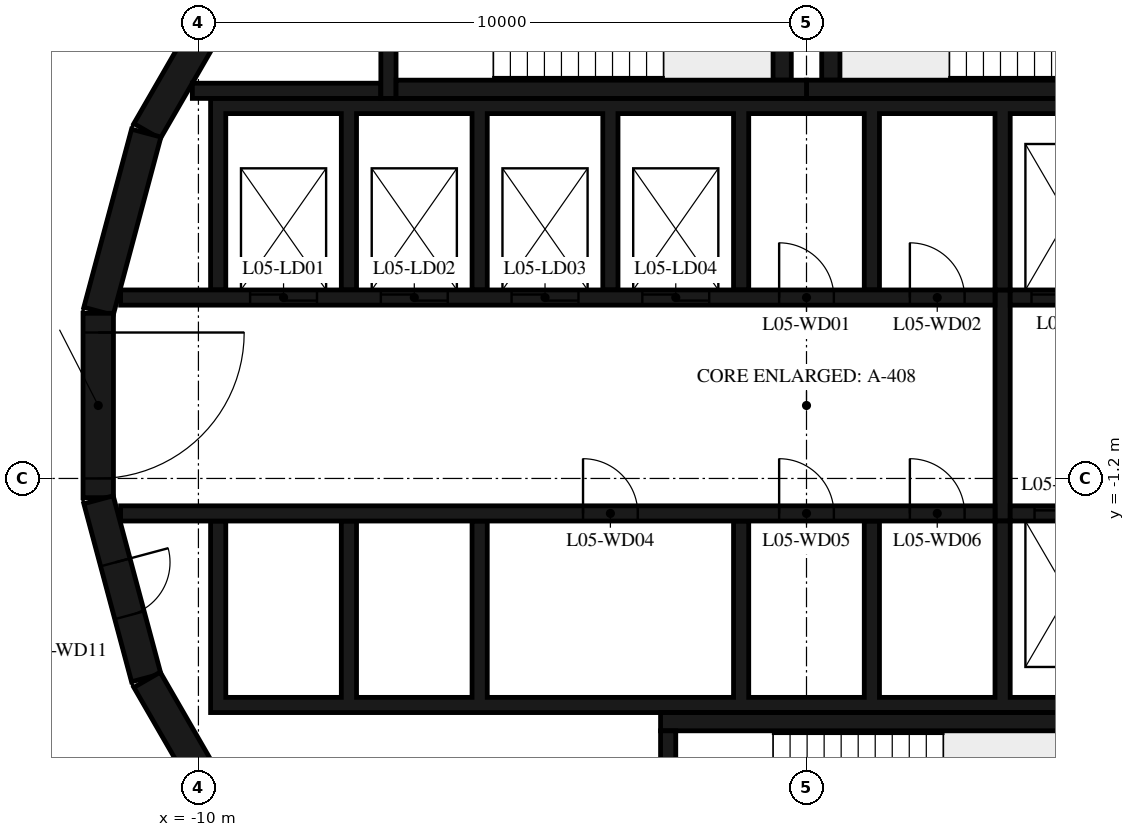
"""IFC4 building model, lengths in metres.
Left out: names, types, materials, properties, quantities, classifications, styles, units other than length and angle.
Written with IfcOpenShell. Run it as: python <this file> out.ifc"""

import sys

from ifc_helpers import new_model, si_unit, direction, frame, frame_2d, origin, place, context, subcontext, project, spatial, polyline, rectangle, outline, extrude, element, fill, save


model = new_model("IFC4")
c1 = context("Model", 3, precision=1e-05, world=origin(), true_north=direction((0.0, 1.0)))
c2 = subcontext(c1, "Body", "Model", "MODEL_VIEW")
j1 = project(units=[si_unit("LENGTHUNIT", "METRE"), si_unit("PLANEANGLEUNIT", "RADIAN")], contexts=[c1])
p1 = place(None, origin())
s1 = spatial("IfcSite", under=j1, at=p1, CompositionType="ELEMENT")
p2 = place(p1, origin())
s2 = spatial("IfcBuilding", under=s1, at=p2, CompositionType="ELEMENT")
p3 = place(p2, frame((0.0, 0.0, 28.2)))
s3 = spatial("IfcBuildingStorey", under=s2, at=p3, CompositionType="ELEMENT", Elevation=28.2)
for number, where, z_axis, x_axis in (
    (1, (-9.329, 7.137, 0.0), (0.0, 0.0, 1.0), (-0.5, -0.866, 0.0)),
    (2, (-10.858, 4.479, 0.0), (0.0, 0.0, 1.0), (-0.259, -0.966, 0.0)),
):
    element("IfcWall", number, at=place(p3, frame(where, z_axis=z_axis, x_axis=x_axis)), inside=s3, PredefinedType="SHEAR", context=c2, shape_type="SweptSolid", body=[
        extrude(rectangle(XDim=3.033, YDim=0.5, at=frame_2d((1.516, 0.0))), origin(), (0.0, 0.0, 1.0), 4.35),
    ])
p4 = place(p3, frame((-11.647, 1.516, 0.0), z_axis=(0.0, 0.0, 1.0), x_axis=(0.0, -1.0, 0.0)))
e3 = element("IfcWall", 3, at=p4, inside=s3, PredefinedType="SHEAR", context=c2, shape_type="SweptSolid", body=[
    extrude(rectangle(XDim=3.033, YDim=0.5, at=frame_2d((1.516, 0.0))), origin(), (0.0, 0.0, 1.0), 4.35),
])
p5 = place(p4, frame((0.316, 0.0, 0.0)))
e4 = element("IfcOpeningElement", 4, at=p5, cuts=e3, PredefinedType="OPENING", context=c2, shape_type="SweptSolid", body=[
    extrude(rectangle(XDim=2.4, YDim=2.1, at=frame_2d((1.2, 1.05))), frame((0.0, 0.26, 0.0), z_axis=(0.0, -1.0, 0.0), x_axis=(1.0, 0.0, 0.0)), (0.0, 0.0, 1.0), 0.52),
])
p6 = place(p3, frame((-11.643, -1.55, 0.0), z_axis=(0.0, 0.0, 1.0), x_axis=(0.258734743916, -0.965948410781, 0.0)))
e5 = element("IfcWall", 5, at=p6, inside=s3, PredefinedType="SHEAR", context=c2, shape_type="SweptSolid", body=[
    extrude(rectangle(XDim=3.033, YDim=0.5, at=frame_2d((1.516, 0.0))), origin(), (0.0, 0.0, 1.0), 4.35),
])
p7 = place(p6, frame((1.066, 0.0, 0.0)))
e6 = element("IfcOpeningElement", 6, at=p7, cuts=e5, PredefinedType="OPENING", context=c2, shape_type="SweptSolid", body=[
    extrude(rectangle(XDim=0.9, YDim=2.1, at=frame_2d((0.45, 1.05))), frame((0.0, 0.26, 0.0), z_axis=(0.0, -1.0, 0.0), x_axis=(1.0, 0.0, 0.0)), (0.0, 0.0, 1.0), 0.52),
])
p8 = place(p3, frame((-10.845, -4.51, 0.0), z_axis=(0.0, 0.0, 1.0), x_axis=(0.500087131594, -0.865975092491, 0.0)))
e7 = element("IfcWall", 7, at=p8, inside=s3, PredefinedType="SHEAR", context=c2, shape_type="SweptSolid", body=[
    extrude(rectangle(XDim=3.033, YDim=0.5, at=frame_2d((1.516, 0.0))), origin(), (0.0, 0.0, 1.0), 4.35),
])
p9 = place(p3, frame((0.0, 5.2, 0.0), z_axis=(0.0, 0.0, 1.0), x_axis=(1.0, 0.0, 0.0)))
e8 = element("IfcWall", 8, at=p9, inside=s3, PredefinedType="SHEAR", context=c2, shape_type="SweptSolid", body=[
    extrude(rectangle(XDim=6.75, YDim=0.3, at=frame_2d((3.375, 0.0))), origin(), (0.0, 0.0, 1.0), 4.35),
])
p10 = place(p3, frame((0.4, 5.35, 0.0), z_axis=(0.0, 0.0, 1.0), x_axis=(0.0, 1.0, 0.0)))
e9 = element("IfcWall", 9, at=p10, inside=s3, PredefinedType="SHEAR", context=c2, shape_type="SweptSolid", body=[
    extrude(rectangle(XDim=3.32, YDim=0.3, at=frame_2d((1.66, 0.0))), origin(), (0.0, 0.0, 1.0), 4.35),
])
p11 = place(p3, frame((-6.75, 5.2, 0.0), z_axis=(0.0, 0.0, 1.0), x_axis=(1.0, 0.0, 0.0)))
e10 = element("IfcWall", 10, at=p11, inside=s3, PredefinedType="SHEAR", context=c2, shape_type="SweptSolid", body=[
    extrude(rectangle(XDim=6.75, YDim=0.3, at=frame_2d((3.375, 0.0))), origin(), (0.0, 0.0, 1.0), 4.35),
])
p12 = place(p3, frame((-0.4, 5.35, 0.0), z_axis=(0.0, 0.0, 1.0), x_axis=(0.0, 1.0, 0.0)))
e11 = element("IfcWall", 11, at=p12, inside=s3, PredefinedType="SHEAR", context=c2, shape_type="SweptSolid", body=[
    extrude(rectangle(XDim=3.32, YDim=0.3, at=frame_2d((1.66, 0.0))), origin(), (0.0, 0.0, 1.0), 4.35),
])
p13 = place(p3, frame((-6.875, 8.97, 0.0), z_axis=(0.0, 0.0, 1.0), x_axis=(0.0, -1.0, 0.0)))
e12 = element("IfcWall", 12, at=p13, inside=s3, PredefinedType="SHEAR", context=c2, shape_type="SweptSolid", body=[
    extrude(rectangle(XDim=3.92, YDim=0.25, at=frame_2d((1.96, 0.0))), origin(), (0.0, 0.0, 1.0), 4.35),
])
p14 = place(p13, frame((1.61, 0.0, 0.0)))
e13 = element("IfcOpeningElement", 13, at=p14, cuts=e12, PredefinedType="OPENING", context=c2, shape_type="SweptSolid", body=[
    extrude(rectangle(XDim=1.2, YDim=2.1, at=frame_2d((0.6, 1.05))), frame((0.0, 0.135, 0.0), z_axis=(0.0, -1.0, 0.0), x_axis=(1.0, 0.0, 0.0)), (0.0, 0.0, 1.0), 0.27),
])
p15 = place(p3, frame((-7.0, 5.175, 0.0), z_axis=(0.0, 0.0, 1.0), x_axis=(-1.0, 0.0, 0.0)))
e14 = element("IfcWall", 14, at=p15, inside=s3, PredefinedType="SHEAR", context=c2, shape_type="SweptSolid", body=[
    extrude(rectangle(XDim=3.1, YDim=0.25, at=frame_2d((1.55, 0.0))), origin(), (0.0, 0.0, 1.0), 4.35),
])
p16 = place(p3, frame((-2.275, -8.67, 0.0), z_axis=(0.0, 0.0, 1.0), x_axis=(0.0, 1.0, 0.0)))
e15 = element("IfcWall", 15, at=p16, inside=s3, PredefinedType="SHEAR", context=c2, shape_type="SweptSolid", body=[
    extrude(rectangle(XDim=3.32, YDim=0.25, at=frame_2d((1.66, 0.0))), origin(), (0.0, 0.0, 1.0), 4.35),
])
p17 = place(p3, frame((-2.4, -5.2, 0.0), z_axis=(0.0, 0.0, 1.0), x_axis=(1.0, 0.0, 0.0)))
e16 = element("IfcWall", 16, at=p17, inside=s3, PredefinedType="SHEAR", context=c2, shape_type="SweptSolid", body=[
    extrude(rectangle(XDim=7.05, YDim=0.3, at=frame_2d((3.525, 0.0))), origin(), (0.0, 0.0, 1.0), 4.35),
])
p18 = place(p3, origin())
e17 = element("IfcWall", 17, at=p18, inside=s3, PredefinedType="SHEAR", context=c2, shape_type="SweptSolid", body=[
    extrude(outline(polyline([(-9.55, 4.8), (-7.65, 4.8), (-7.65, 1.9), (-7.4, 1.9), (-7.4, 4.8), (-5.5, 4.8), (-5.5, 1.9), (-5.25, 1.9), (-5.25, 4.8), (-3.35, 4.8), (-3.35, 1.9), (-3.1, 1.9), (-3.1, 4.8), (-1.2, 4.8), (-1.2, 1.9), (-0.95, 1.9), (-0.95, 4.8), (0.95, 4.8), (0.95, 1.9), (1.2, 1.9), (1.2, 4.8), (3.1, 4.8), (3.1, 1.9), (3.35, 1.9), (3.35, 4.8), (5.25, 4.8), (5.25, 1.9), (5.5, 1.9), (5.5, 4.8), (7.4, 4.8), (7.4, 1.9), (7.65, 1.9), (7.65, 4.8), (9.55, 4.8), (9.55, 1.9), (9.8, 1.9), (9.8, 4.8), (9.8, 5.05), (-9.8, 5.05), (-9.8, 4.8), (-9.8, 1.9), (-9.55, 1.9), (-9.55, 4.8)])), origin(), (0.0, 0.0, 1.0), 4.35),
])
p19 = place(p3, origin())
e18 = element("IfcWall", 18, at=p19, inside=s3, PredefinedType="SHEAR", context=c2, shape_type="SweptSolid", body=[
    extrude(outline(polyline([(9.8, -5.05), (9.8, -4.8), (9.8, -1.9), (9.55, -1.9), (9.55, -4.8), (7.65, -4.8), (7.65, -1.9), (7.4, -1.9), (7.4, -4.8), (5.5, -4.8), (5.5, -1.9), (5.25, -1.9), (5.25, -4.8), (3.35, -4.8), (3.35, -1.9), (3.1, -1.9), (3.1, -4.8), (1.2, -4.8), (1.2, -1.9), (0.95, -1.9), (0.95, -4.8), (-0.95, -4.8), (-0.95, -1.9), (-1.2, -1.9), (-1.2, -4.8), (-5.25, -4.8), (-5.25, -1.9), (-5.5, -1.9), (-5.5, -4.8), (-7.4, -4.8), (-7.4, -1.9), (-7.65, -1.9), (-7.65, -4.8), (-9.55, -4.8), (-9.55, -1.9), (-9.8, -1.9), (-9.8, -4.8), (-9.8, -5.05), (9.8, -5.05)])), origin(), (0.0, 0.0, 1.0), 4.35),
])
p20 = place(p3, frame((-11.28, 1.775, 0.0), z_axis=(0.0, 0.0, 1.0), x_axis=(1.0, 0.0, 0.0)))
e19 = element("IfcWall", 19, at=p20, inside=s3, PredefinedType="SHEAR", context=c2, shape_type="SweptSolid", body=[
    extrude(rectangle(XDim=14.38, YDim=0.25, at=frame_2d((7.19, 0.0))), origin(), (0.0, 0.0, 1.0), 4.35),
])
p21 = place(p20, frame((2.13, 0.0, 0.0)))
e20 = element("IfcOpeningElement", 20, at=p21, cuts=e19, PredefinedType="OPENING", context=c2, shape_type="SweptSolid", body=[
    extrude(rectangle(XDim=1.1, YDim=2.1, at=frame_2d((0.55, 1.05))), frame((0.0, 0.135, 0.0), z_axis=(0.0, -1.0, 0.0), x_axis=(1.0, 0.0, 0.0)), (0.0, 0.0, 1.0), 0.27),
])
p22 = place(p20, frame((4.28, 0.0, 0.0)))
e21 = element("IfcOpeningElement", 21, at=p22, cuts=e19, PredefinedType="OPENING", context=c2, shape_type="SweptSolid", body=[
    extrude(rectangle(XDim=1.1, YDim=2.1, at=frame_2d((0.55, 1.05))), frame((0.0, 0.135, 0.0), z_axis=(0.0, -1.0, 0.0), x_axis=(1.0, 0.0, 0.0)), (0.0, 0.0, 1.0), 0.27),
])
p23 = place(p20, frame((6.43, 0.0, 0.0)))
e22 = element("IfcOpeningElement", 22, at=p23, cuts=e19, PredefinedType="OPENING", context=c2, shape_type="SweptSolid", body=[
    extrude(rectangle(XDim=1.1, YDim=2.1, at=frame_2d((0.55, 1.05))), frame((0.0, 0.135, 0.0), z_axis=(0.0, -1.0, 0.0), x_axis=(1.0, 0.0, 0.0)), (0.0, 0.0, 1.0), 0.27),
])
p24 = place(p20, frame((8.58, 0.0, 0.0)))
e23 = element("IfcOpeningElement", 23, at=p24, cuts=e19, PredefinedType="OPENING", context=c2, shape_type="SweptSolid", body=[
    extrude(rectangle(XDim=1.1, YDim=2.1, at=frame_2d((0.55, 1.05))), frame((0.0, 0.135, 0.0), z_axis=(0.0, -1.0, 0.0), x_axis=(1.0, 0.0, 0.0)), (0.0, 0.0, 1.0), 0.27),
])
p25 = place(p20, frame((10.83, 0.0, 0.0)))
e24 = element("IfcOpeningElement", 24, at=p25, cuts=e19, PredefinedType="OPENING", context=c2, shape_type="SweptSolid", body=[
    extrude(rectangle(XDim=0.9, YDim=2.1, at=frame_2d((0.45, 1.05))), frame((0.0, 0.135, 0.0), z_axis=(0.0, -1.0, 0.0), x_axis=(1.0, 0.0, 0.0)), (0.0, 0.0, 1.0), 0.27),
])
p26 = place(p20, frame((12.98, 0.0, 0.0)))
e25 = element("IfcOpeningElement", 25, at=p26, cuts=e19, PredefinedType="OPENING", context=c2, shape_type="SweptSolid", body=[
    extrude(rectangle(XDim=0.9, YDim=2.1, at=frame_2d((0.45, 1.05))), frame((0.0, 0.135, 0.0), z_axis=(0.0, -1.0, 0.0), x_axis=(1.0, 0.0, 0.0)), (0.0, 0.0, 1.0), 0.27),
])
p27 = place(p3, frame((3.35, 1.775, 0.0), z_axis=(0.0, 0.0, 1.0), x_axis=(1.0, 0.0, 0.0)))
e26 = element("IfcWall", 26, at=p27, inside=s3, PredefinedType="SHEAR", context=c2, shape_type="SweptSolid", body=[
    extrude(rectangle(XDim=7.93, YDim=0.25, at=frame_2d((3.965, 0.0))), origin(), (0.0, 0.0, 1.0), 4.35),
])
p28 = place(p27, frame((0.35, 0.0, 0.0)))
e27 = element("IfcOpeningElement", 27, at=p28, cuts=e26, PredefinedType="OPENING", context=c2, shape_type="SweptSolid", body=[
    extrude(rectangle(XDim=1.2, YDim=2.4, at=frame_2d((0.6, 1.2))), frame((0.0, 0.135, 0.0), z_axis=(0.0, -1.0, 0.0), x_axis=(1.0, 0.0, 0.0)), (0.0, 0.0, 1.0), 0.27),
])
p29 = place(p27, frame((2.5, 0.0, 0.0)))
e28 = element("IfcOpeningElement", 28, at=p29, cuts=e26, PredefinedType="OPENING", context=c2, shape_type="SweptSolid", body=[
    extrude(rectangle(XDim=1.2, YDim=2.4, at=frame_2d((0.6, 1.2))), frame((0.0, 0.135, 0.0), z_axis=(0.0, -1.0, 0.0), x_axis=(1.0, 0.0, 0.0)), (0.0, 0.0, 1.0), 0.27),
])
p30 = place(p27, frame((4.8, 0.0, 0.0)))
e29 = element("IfcOpeningElement", 29, at=p30, cuts=e26, PredefinedType="OPENING", context=c2, shape_type="SweptSolid", body=[
    extrude(rectangle(XDim=0.9, YDim=2.1, at=frame_2d((0.45, 1.05))), frame((0.0, 0.135, 0.0), z_axis=(0.0, -1.0, 0.0), x_axis=(1.0, 0.0, 0.0)), (0.0, 0.0, 1.0), 0.27),
])
p31 = place(p3, frame((-11.28, -1.775, 0.0), z_axis=(0.0, 0.0, 1.0), x_axis=(1.0, 0.0, 0.0)))
e30 = element("IfcWall", 30, at=p31, inside=s3, PredefinedType="SHEAR", context=c2, shape_type="SweptSolid", body=[
    extrude(rectangle(XDim=14.38, YDim=0.25, at=frame_2d((7.19, 0.0))), origin(), (0.0, 0.0, 1.0), 4.35),
])
p32 = place(p31, frame((7.605, 0.0, 0.0)))
e31 = element("IfcOpeningElement", 31, at=p32, cuts=e30, PredefinedType="OPENING", context=c2, shape_type="SweptSolid", body=[
    extrude(rectangle(XDim=0.9, YDim=2.1, at=frame_2d((0.45, 1.05))), frame((0.0, 0.135, 0.0), z_axis=(0.0, -1.0, 0.0), x_axis=(1.0, 0.0, 0.0)), (0.0, 0.0, 1.0), 0.27),
])
p33 = place(p31, frame((10.83, 0.0, 0.0)))
e32 = element("IfcOpeningElement", 32, at=p33, cuts=e30, PredefinedType="OPENING", context=c2, shape_type="SweptSolid", body=[
    extrude(rectangle(XDim=0.9, YDim=2.1, at=frame_2d((0.45, 1.05))), frame((0.0, 0.135, 0.0), z_axis=(0.0, -1.0, 0.0), x_axis=(1.0, 0.0, 0.0)), (0.0, 0.0, 1.0), 0.27),
])
p34 = place(p31, frame((12.98, 0.0, 0.0)))
e33 = element("IfcOpeningElement", 33, at=p34, cuts=e30, PredefinedType="OPENING", context=c2, shape_type="SweptSolid", body=[
    extrude(rectangle(XDim=0.9, YDim=2.1, at=frame_2d((0.45, 1.05))), frame((0.0, 0.135, 0.0), z_axis=(0.0, -1.0, 0.0), x_axis=(1.0, 0.0, 0.0)), (0.0, 0.0, 1.0), 0.27),
])
p35 = place(p3, frame((3.35, -1.775, 0.0), z_axis=(0.0, 0.0, 1.0), x_axis=(1.0, 0.0, 0.0)))
e34 = element("IfcWall", 34, at=p35, inside=s3, PredefinedType="SHEAR", context=c2, shape_type="SweptSolid", body=[
    extrude(rectangle(XDim=7.93, YDim=0.25, at=frame_2d((3.965, 0.0))), origin(), (0.0, 0.0, 1.0), 4.35),
])
p36 = place(p35, frame((0.4, 0.0, 0.0)))
e35 = element("IfcOpeningElement", 35, at=p36, cuts=e34, PredefinedType="OPENING", context=c2, shape_type="SweptSolid", body=[
    extrude(rectangle(XDim=1.1, YDim=2.4, at=frame_2d((0.55, 1.2))), frame((0.0, 0.135, 0.0), z_axis=(0.0, -1.0, 0.0), x_axis=(1.0, 0.0, 0.0)), (0.0, 0.0, 1.0), 0.27),
])
p37 = place(p35, frame((2.55, 0.0, 0.0)))
e36 = element("IfcOpeningElement", 36, at=p37, cuts=e34, PredefinedType="OPENING", context=c2, shape_type="SweptSolid", body=[
    extrude(rectangle(XDim=1.1, YDim=2.4, at=frame_2d((0.55, 1.2))), frame((0.0, 0.135, 0.0), z_axis=(0.0, -1.0, 0.0), x_axis=(1.0, 0.0, 0.0)), (0.0, 0.0, 1.0), 0.27),
])
p38 = place(p35, frame((4.7, 0.0, 0.0)))
e37 = element("IfcOpeningElement", 37, at=p38, cuts=e34, PredefinedType="OPENING", context=c2, shape_type="SweptSolid", body=[
    extrude(rectangle(XDim=1.1, YDim=2.4, at=frame_2d((0.55, 1.2))), frame((0.0, 0.135, 0.0), z_axis=(0.0, -1.0, 0.0), x_axis=(1.0, 0.0, 0.0)), (0.0, 0.0, 1.0), 0.27),
])
p39 = place(p3, frame((3.225, -1.9, 0.0), z_axis=(0.0, 0.0, 1.0), x_axis=(0.0, 1.0, 0.0)))
e38 = element("IfcWall", 38, at=p39, inside=s3, PredefinedType="SHEAR", context=c2, shape_type="SweptSolid", body=[
    extrude(rectangle(XDim=3.8, YDim=0.25, at=frame_2d((1.9, 0.0))), origin(), (0.0, 0.0, 1.0), 4.35),
])
p40 = place(p5, origin())
e39 = element("IfcDoor", 39, at=p40, inside=s3, OperationType="DOUBLE_DOOR_SINGLE_SWING", PredefinedType="DOOR", context=c2, shape_type="SweptSolid", body=[
    extrude(rectangle(XDim=2.4, YDim=2.1, at=frame_2d((1.2, 1.05))), frame((0.0, 0.025, 0.0), z_axis=(0.0, -1.0, 0.0), x_axis=(1.0, 0.0, 0.0)), (0.0, 0.0, 1.0), 0.05),
])
fill(e4, e39)
p41 = place(p21, origin())
e40 = element("IfcDoor", 40, at=p41, inside=s3, OperationType="DOUBLE_DOOR_SLIDING", PredefinedType="DOOR", context=c2, shape_type="SweptSolid", body=[
    extrude(rectangle(XDim=1.1, YDim=2.1, at=frame_2d((0.55, 1.05))), frame((0.0, 0.025, 0.0), z_axis=(0.0, -1.0, 0.0), x_axis=(1.0, 0.0, 0.0)), (0.0, 0.0, 1.0), 0.05),
])
fill(e20, e40)
p42 = place(p22, origin())
e41 = element("IfcDoor", 41, at=p42, inside=s3, OperationType="DOUBLE_DOOR_SLIDING", PredefinedType="DOOR", context=c2, shape_type="SweptSolid", body=[
    extrude(rectangle(XDim=1.1, YDim=2.1, at=frame_2d((0.55, 1.05))), frame((0.0, 0.025, 0.0), z_axis=(0.0, -1.0, 0.0), x_axis=(1.0, 0.0, 0.0)), (0.0, 0.0, 1.0), 0.05),
])
fill(e21, e41)
p43 = place(p23, origin())
e42 = element("IfcDoor", 42, at=p43, inside=s3, OperationType="DOUBLE_DOOR_SLIDING", PredefinedType="DOOR", context=c2, shape_type="SweptSolid", body=[
    extrude(rectangle(XDim=1.1, YDim=2.1, at=frame_2d((0.55, 1.05))), frame((0.0, 0.025, 0.0), z_axis=(0.0, -1.0, 0.0), x_axis=(1.0, 0.0, 0.0)), (0.0, 0.0, 1.0), 0.05),
])
fill(e22, e42)
p44 = place(p24, origin())
e43 = element("IfcDoor", 43, at=p44, inside=s3, OperationType="DOUBLE_DOOR_SLIDING", PredefinedType="DOOR", context=c2, shape_type="SweptSolid", body=[
    extrude(rectangle(XDim=1.1, YDim=2.1, at=frame_2d((0.55, 1.05))), frame((0.0, 0.025, 0.0), z_axis=(0.0, -1.0, 0.0), x_axis=(1.0, 0.0, 0.0)), (0.0, 0.0, 1.0), 0.05),
])
fill(e23, e43)
p45 = place(p28, origin())
e44 = element("IfcDoor", 44, at=p45, inside=s3, OperationType="DOUBLE_DOOR_SLIDING", PredefinedType="DOOR", context=c2, shape_type="SweptSolid", body=[
    extrude(rectangle(XDim=1.2, YDim=2.4, at=frame_2d((0.6, 1.2))), frame((0.0, 0.025, 0.0), z_axis=(0.0, -1.0, 0.0), x_axis=(1.0, 0.0, 0.0)), (0.0, 0.0, 1.0), 0.05),
])
fill(e27, e44)
p46 = place(p36, origin())
e45 = element("IfcDoor", 45, at=p46, inside=s3, OperationType="DOUBLE_DOOR_SLIDING", PredefinedType="DOOR", context=c2, shape_type="SweptSolid", body=[
    extrude(rectangle(XDim=1.1, YDim=2.4, at=frame_2d((0.55, 1.2))), frame((0.0, 0.025, 0.0), z_axis=(0.0, -1.0, 0.0), x_axis=(1.0, 0.0, 0.0)), (0.0, 0.0, 1.0), 0.05),
])
fill(e35, e45)
p47 = place(p25, origin())
e46 = element("IfcDoor", 46, at=p47, inside=s3, OperationType="SINGLE_SWING_RIGHT", PredefinedType="DOOR", context=c2, shape_type="SweptSolid", body=[
    extrude(rectangle(XDim=0.9, YDim=2.1, at=frame_2d((0.45, 1.05))), frame((0.0, 0.025, 0.0), z_axis=(0.0, -1.0, 0.0), x_axis=(1.0, 0.0, 0.0)), (0.0, 0.0, 1.0), 0.05),
])
fill(e24, e46)
p48 = place(p26, origin())
e47 = element("IfcDoor", 47, at=p48, inside=s3, OperationType="SINGLE_SWING_LEFT", PredefinedType="DOOR", context=c2, shape_type="SweptSolid", body=[
    extrude(rectangle(XDim=0.9, YDim=2.1, at=frame_2d((0.45, 1.05))), frame((0.0, 0.025, 0.0), z_axis=(0.0, -1.0, 0.0), x_axis=(1.0, 0.0, 0.0)), (0.0, 0.0, 1.0), 0.05),
])
fill(e25, e47)
p49 = place(p32, origin())
e48 = element("IfcDoor", 48, at=p49, inside=s3, OperationType="SINGLE_SWING_LEFT", PredefinedType="DOOR", context=c2, shape_type="SweptSolid", body=[
    extrude(rectangle(XDim=0.9, YDim=2.1, at=frame_2d((0.45, 1.05))), frame((0.0, 0.025, 0.0), z_axis=(0.0, -1.0, 0.0), x_axis=(1.0, 0.0, 0.0)), (0.0, 0.0, 1.0), 0.05),
])
fill(e31, e48)
p50 = place(p33, origin())
e49 = element("IfcDoor", 49, at=p50, inside=s3, OperationType="SINGLE_SWING_RIGHT", PredefinedType="DOOR", context=c2, shape_type="SweptSolid", body=[
    extrude(rectangle(XDim=0.9, YDim=2.1, at=frame_2d((0.45, 1.05))), frame((0.0, 0.025, 0.0), z_axis=(0.0, -1.0, 0.0), x_axis=(1.0, 0.0, 0.0)), (0.0, 0.0, 1.0), 0.05),
])
fill(e32, e49)
p51 = place(p34, origin())
e50 = element("IfcDoor", 50, at=p51, inside=s3, OperationType="SINGLE_SWING_LEFT", PredefinedType="DOOR", context=c2, shape_type="SweptSolid", body=[
    extrude(rectangle(XDim=0.9, YDim=2.1, at=frame_2d((0.45, 1.05))), frame((0.0, 0.025, 0.0), z_axis=(0.0, -1.0, 0.0), x_axis=(1.0, 0.0, 0.0)), (0.0, 0.0, 1.0), 0.05),
])
fill(e33, e50)
p52 = place(p7, origin())
e51 = element("IfcDoor", 51, at=p52, inside=s3, OperationType="SINGLE_SWING_RIGHT", PredefinedType="DOOR", context=c2, shape_type="SweptSolid", body=[
    extrude(rectangle(XDim=0.9, YDim=2.1, at=frame_2d((0.45, 1.05))), frame((0.0, 0.025, 0.0), z_axis=(0.0, -1.0, 0.0), x_axis=(1.0, 0.0, 0.0)), (0.0, 0.0, 1.0), 0.05),
])
fill(e6, e51)
save(model, sys.argv[1])
